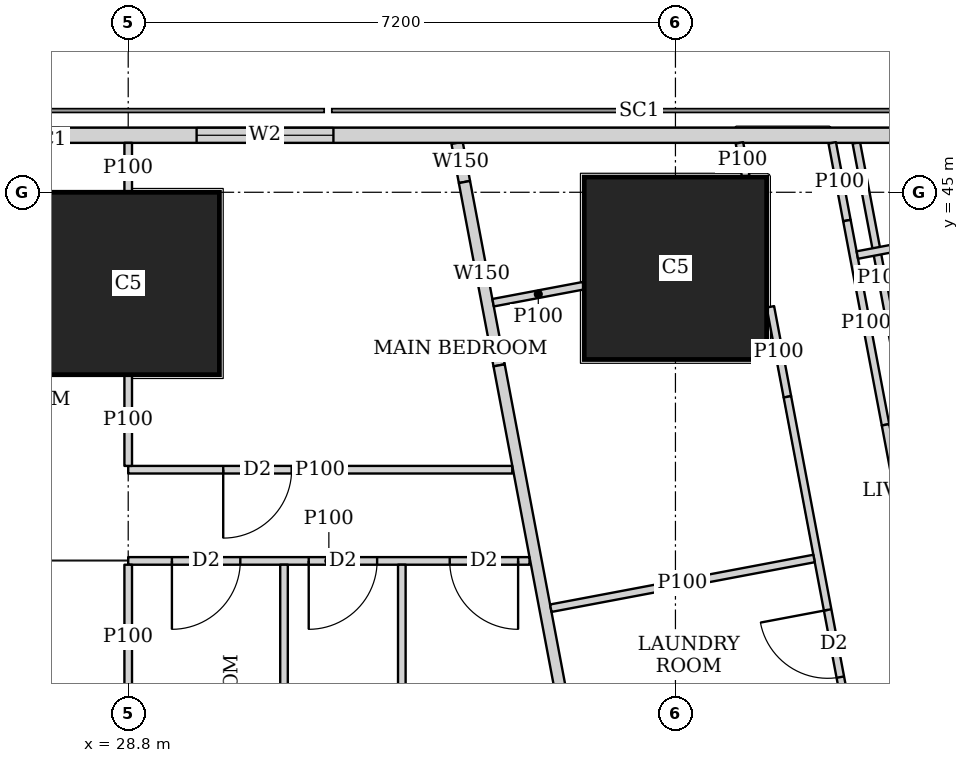
"""IFC4 building model, lengths in metres.
Left out: names, types, materials, properties, quantities, classifications, styles, units other than length and angle.
Written with IfcOpenShell. Run it as: python <this file> out.ifc"""

import sys

from ifc_helpers import new_model, si_unit, direction, frame, frame_2d, origin, origin_2d, place, context, subcontext, project, spatial, rectangle, extrude, element, fill, save


model = new_model("IFC4")
c1 = context("Model", 3, precision=1e-05, world=origin(), true_north=direction((0.0, 1.0)))
c2 = subcontext(c1, "Body", "Model", "MODEL_VIEW")
j1 = project(units=[si_unit("LENGTHUNIT", "METRE"), si_unit("PLANEANGLEUNIT", "RADIAN")], contexts=[c1])
p1 = place(None, origin())
s1 = spatial("IfcSite", under=j1, at=p1, CompositionType="ELEMENT")
p2 = place(p1, origin())
s2 = spatial("IfcBuilding", under=s1, at=p2, CompositionType="ELEMENT")
p3 = place(p2, frame((0.0, 0.0, 227.45)))
s3 = spatial("IfcBuildingStorey", under=s2, at=p3, CompositionType="ELEMENT", Elevation=227.45)
for number, where, z_axis, x_axis in (
    (1, (28.8, 43.8, 0.0), (0.0, 0.0, 1.0), (1.0, 0.0, 0.0)),
    (2, (36.0, 44.0, 0.0), (0.0, 0.0, 1.0), (1.0, 0.0, 0.0)),
):
    element("IfcColumn", number, at=place(p3, frame(where, z_axis=z_axis, x_axis=x_axis)), inside=s3, PredefinedType="COLUMN", context=c2, shape_type="SweptSolid", body=[
        extrude(rectangle(XDim=2.4, YDim=2.4, at=origin_2d()), origin(), (0.0, 0.0, 1.0), 3.75),
    ])
p4 = place(p3, frame((40.106, 45.75, 0.0), z_axis=(0.0, 0.0, 1.0), x_axis=(-1.0, 0.0, 0.0)))
e3 = element("IfcWall", 3, at=p4, inside=s3, PredefinedType="SOLIDWALL", context=c2, shape_type="SweptSolid", body=[
    extrude(rectangle(XDim=25.543, YDim=0.2, at=frame_2d((12.771, 0.0))), origin(), (0.0, 0.0, 1.0), 3.5),
])
p5 = place(p4, frame((8.606, 0.0, 0.9)))
e4 = element("IfcOpeningElement", 4, at=p5, cuts=e3, PredefinedType="OPENING", context=c2, shape_type="SweptSolid", body=[
    extrude(rectangle(XDim=1.8, YDim=1.5, at=frame_2d((0.9, 0.75))), frame((0.0, 0.11, 0.0), z_axis=(0.0, -1.0, 0.0), x_axis=(1.0, 0.0, 0.0)), (0.0, 0.0, 1.0), 0.22),
])
p6 = place(p4, frame((12.206, 0.0, 0.9)))
e5 = element("IfcOpeningElement", 5, at=p6, cuts=e3, PredefinedType="OPENING", context=c2, shape_type="SweptSolid", body=[
    extrude(rectangle(XDim=1.8, YDim=1.5, at=frame_2d((0.9, 0.75))), frame((0.0, 0.11, 0.0), z_axis=(0.0, -1.0, 0.0), x_axis=(1.0, 0.0, 0.0)), (0.0, 0.0, 1.0), 0.22),
])
p7 = place(p4, frame((15.806, 0.0, 0.9)))
e6 = element("IfcOpeningElement", 6, at=p7, cuts=e3, PredefinedType="OPENING", context=c2, shape_type="SweptSolid", body=[
    extrude(rectangle(XDim=1.8, YDim=1.5, at=frame_2d((0.9, 0.75))), frame((0.0, 0.11, 0.0), z_axis=(0.0, -1.0, 0.0), x_axis=(1.0, 0.0, 0.0)), (0.0, 0.0, 1.0), 0.22),
])
p8 = place(p4, frame((20.825, 0.0, 0.9)))
e7 = element("IfcOpeningElement", 7, at=p8, cuts=e3, PredefinedType="OPENING", context=c2, shape_type="SweptSolid", body=[
    extrude(rectangle(XDim=2.4, YDim=1.5, at=frame_2d((1.2, 0.75))), frame((0.0, 0.11, 0.0), z_axis=(0.0, -1.0, 0.0), x_axis=(1.0, 0.0, 0.0)), (0.0, 0.0, 1.0), 0.22),
])
p9 = place(p3, frame((33.127, 45.65, 0.0), z_axis=(0.0, 0.0, 1.0), x_axis=(0.185441815104, -0.982655246366, 0.0)))
e8 = element("IfcWall", 8, at=p9, inside=s3, PredefinedType="SOLIDWALL", context=c2, shape_type="SweptSolid", body=[
    extrude(rectangle(XDim=0.524, YDim=0.15, at=frame_2d((0.262, 0.0))), origin(), (0.0, 0.0, 1.0), 3.5),
])
p10 = place(p3, frame((33.224, 45.135, 0.0), z_axis=(0.0, 0.0, 1.0), x_axis=(0.185681462868, -0.982609990967, 0.0)))
e9 = element("IfcWall", 9, at=p10, inside=s3, PredefinedType="SOLIDWALL", context=c2, shape_type="SweptSolid", body=[
    extrude(rectangle(XDim=2.455, YDim=0.15, at=frame_2d((1.228, 0.0))), origin(), (0.0, 0.0, 1.0), 2.05),
])
p11 = place(p3, frame((33.68, 42.723, 0.0), z_axis=(0.0, 0.0, 1.0), x_axis=(0.185601160014, -0.982625162207, 0.0)))
e10 = element("IfcWall", 10, at=p11, inside=s3, PredefinedType="SOLIDWALL", context=c2, shape_type="SweptSolid", body=[
    extrude(rectangle(XDim=41.051, YDim=0.15, at=frame_2d((20.526, 0.0))), origin(), (0.0, 0.0, 1.0), 2.5),
])
p12 = place(p11, frame((16.123, 0.0, 0.0)))
e11 = element("IfcOpeningElement", 11, at=p12, cuts=e10, PredefinedType="OPENING", context=c2, shape_type="SweptSolid", body=[
    extrude(rectangle(XDim=1.0, YDim=2.1, at=frame_2d((0.5, 1.05))), frame((0.0, 0.085, 0.0), z_axis=(0.0, -1.0, 0.0), x_axis=(1.0, 0.0, 0.0)), (0.0, 0.0, 1.0), 0.17),
])
p13 = place(p11, frame((19.938, 0.0, 0.0)))
e12 = element("IfcOpeningElement", 12, at=p13, cuts=e10, PredefinedType="OPENING", context=c2, shape_type="SweptSolid", body=[
    extrude(rectangle(XDim=1.0, YDim=2.1, at=frame_2d((0.5, 1.05))), frame((0.0, 0.085, 0.0), z_axis=(0.0, -1.0, 0.0), x_axis=(1.0, 0.0, 0.0)), (0.0, 0.0, 1.0), 0.17),
])
p14 = place(p11, frame((30.902, 0.0, 0.0)))
e13 = element("IfcOpeningElement", 13, at=p14, cuts=e10, PredefinedType="OPENING", context=c2, shape_type="SweptSolid", body=[
    extrude(rectangle(XDim=1.0, YDim=2.1, at=frame_2d((0.5, 1.05))), frame((0.0, 0.085, 0.0), z_axis=(0.0, -1.0, 0.0), x_axis=(1.0, 0.0, 0.0)), (0.0, 0.0, 1.0), 0.17),
])
p15 = place(p3, frame((39.054, 42.085, 0.0), z_axis=(0.0, 0.0, 1.0), x_axis=(-0.185791584218, 0.982589175207, 0.0)))
e14 = element("IfcWall", 14, at=p15, inside=s3, PredefinedType="PARTITIONING", context=c2, shape_type="SweptSolid", body=[
    extrude(rectangle(XDim=3.628, YDim=0.1, at=frame_2d((1.814, 0.0))), origin(), (0.0, 0.0, 1.0), 2.05),
])
p16 = place(p3, frame((38.063, 45.65, 0.0), z_axis=(0.0, 0.0, 1.0), x_axis=(0.185677287841, -0.982610779902, 0.0)))
e15 = element("IfcWall", 15, at=p16, inside=s3, PredefinedType="PARTITIONING", context=c2, shape_type="SweptSolid", body=[
    extrude(rectangle(XDim=1.04, YDim=0.1, at=frame_2d((0.52, 0.0))), origin(), (0.0, 0.0, 1.0), 3.5),
])
p17 = place(p3, frame((38.256, 44.628, 0.0), z_axis=(0.0, 0.0, 1.0), x_axis=(0.185700639943, -0.982606366927, 0.0)))
e16 = element("IfcWall", 16, at=p17, inside=s3, PredefinedType="PARTITIONING", context=c2, shape_type="SweptSolid", body=[
    extrude(rectangle(XDim=2.735, YDim=0.1, at=frame_2d((1.367, 0.0))), origin(), (0.0, 0.0, 1.0), 2.05),
])
p18 = place(p3, frame((38.764, 41.941, 0.0), z_axis=(0.0, 0.0, 1.0), x_axis=(0.185512176227, -0.982641965556, 0.0)))
e17 = element("IfcWall", 17, at=p18, inside=s3, PredefinedType="PARTITIONING", context=c2, shape_type="SweptSolid", body=[
    extrude(rectangle(XDim=12.792, YDim=0.1, at=frame_2d((6.396, 0.0))), origin(), (0.0, 0.0, 1.0), 2.5),
])
p19 = place(p18, frame((11.35, 0.0, 0.0)))
e18 = element("IfcOpeningElement", 18, at=p19, cuts=e17, PredefinedType="OPENING", context=c2, shape_type="SweptSolid", body=[
    extrude(rectangle(XDim=0.9, YDim=2.1, at=frame_2d((0.45, 1.05))), frame((0.0, 0.06, 0.0), z_axis=(0.0, -1.0, 0.0), x_axis=(1.0, 0.0, 0.0)), (0.0, 0.0, 1.0), 0.12),
])
p20 = place(p18, frame((8.085, 0.0, 0.0)))
e19 = element("IfcOpeningElement", 19, at=p20, cuts=e17, PredefinedType="OPENING", context=c2, shape_type="SweptSolid", body=[
    extrude(rectangle(XDim=0.9, YDim=2.1, at=frame_2d((0.45, 1.05))), frame((0.0, 0.06, 0.0), z_axis=(0.0, -1.0, 0.0), x_axis=(1.0, 0.0, 0.0)), (0.0, 0.0, 1.0), 0.12),
])
p21 = place(p18, frame((3.7, 0.0, 0.0)))
e20 = element("IfcOpeningElement", 20, at=p21, cuts=e17, PredefinedType="OPENING", context=c2, shape_type="SweptSolid", body=[
    extrude(rectangle(XDim=0.9, YDim=2.1, at=frame_2d((0.45, 1.05))), frame((0.0, 0.06, 0.0), z_axis=(0.0, -1.0, 0.0), x_axis=(1.0, 0.0, 0.0)), (0.0, 0.0, 1.0), 0.12),
])
p22 = place(p3, frame((36.842, 45.65, 0.0), z_axis=(0.0, 0.0, 1.0), x_axis=(0.185407859198, -0.982661653748, 0.0)))
e21 = element("IfcWall", 21, at=p22, inside=s3, PredefinedType="PARTITIONING", context=c2, shape_type="SweptSolid", body=[
    extrude(rectangle(XDim=0.448, YDim=0.1, at=frame_2d((0.224, 0.0))), origin(), (0.0, 0.0, 1.0), 3.5),
])
p23 = place(p3, frame((37.249, 43.493, 0.0), z_axis=(0.0, 0.0, 1.0), x_axis=(0.185817643817, -0.982584247404, 0.0)))
e22 = element("IfcWall", 22, at=p23, inside=s3, PredefinedType="PARTITIONING", context=c2, shape_type="SweptSolid", body=[
    extrude(rectangle(XDim=1.205, YDim=0.1, at=frame_2d((0.603, 0.0))), origin(), (0.0, 0.0, 1.0), 2.05),
])
p24 = place(p3, frame((37.473, 42.309, 0.0), z_axis=(0.0, 0.0, 1.0), x_axis=(0.185570636839, -0.982630927024, 0.0)))
e23 = element("IfcWall", 23, at=p24, inside=s3, PredefinedType="PARTITIONING", context=c2, shape_type="SweptSolid", body=[
    extrude(rectangle(XDim=13.553, YDim=0.1, at=frame_2d((6.777, 0.0))), origin(), (0.0, 0.0, 1.0), 2.5),
])
p25 = place(p24, frame((12.128, 0.0, 0.0)))
e24 = element("IfcOpeningElement", 24, at=p25, cuts=e23, PredefinedType="OPENING", context=c2, shape_type="SweptSolid", body=[
    extrude(rectangle(XDim=0.9, YDim=2.1, at=frame_2d((0.45, 1.05))), frame((0.0, 0.06, 0.0), z_axis=(0.0, -1.0, 0.0), x_axis=(1.0, 0.0, 0.0)), (0.0, 0.0, 1.0), 0.12),
])
p26 = place(p24, frame((8.487, 0.0, 0.0)))
e25 = element("IfcOpeningElement", 25, at=p26, cuts=e23, PredefinedType="OPENING", context=c2, shape_type="SweptSolid", body=[
    extrude(rectangle(XDim=0.9, YDim=2.1, at=frame_2d((0.45, 1.05))), frame((0.0, 0.06, 0.0), z_axis=(0.0, -1.0, 0.0), x_axis=(1.0, 0.0, 0.0)), (0.0, 0.0, 1.0), 0.12),
])
p27 = place(p24, frame((2.853, 0.0, 0.0)))
e26 = element("IfcOpeningElement", 26, at=p27, cuts=e23, PredefinedType="OPENING", context=c2, shape_type="SweptSolid", body=[
    extrude(rectangle(XDim=0.9, YDim=2.1, at=frame_2d((0.45, 1.05))), frame((0.0, 0.06, 0.0), z_axis=(0.0, -1.0, 0.0), x_axis=(1.0, 0.0, 0.0)), (0.0, 0.0, 1.0), 0.12),
])
p28 = place(p24, frame((10.22, 0.0, 0.0)))
e27 = element("IfcOpeningElement", 27, at=p28, cuts=e23, PredefinedType="OPENING", context=c2, shape_type="SweptSolid", body=[
    extrude(rectangle(XDim=0.9, YDim=2.1, at=frame_2d((0.45, 1.05))), frame((0.0, 0.06, 0.0), z_axis=(0.0, -1.0, 0.0), x_axis=(1.0, 0.0, 0.0)), (0.0, 0.0, 1.0), 0.12),
])
p29 = place(p24, frame((5.819, 0.0, 0.0)))
e28 = element("IfcOpeningElement", 28, at=p29, cuts=e23, PredefinedType="OPENING", context=c2, shape_type="SweptSolid", body=[
    extrude(rectangle(XDim=0.9, YDim=2.1, at=frame_2d((0.45, 1.05))), frame((0.0, 0.06, 0.0), z_axis=(0.0, -1.0, 0.0), x_axis=(1.0, 0.0, 0.0)), (0.0, 0.0, 1.0), 0.12),
])
p30 = place(p3, frame((41.968, 44.85, 0.0), z_axis=(0.0, 0.0, 1.0), x_axis=(-0.98258614234, -0.185807623311, 0.0)))
e29 = element("IfcWall", 29, at=p30, inside=s3, PredefinedType="PARTITIONING", context=c2, shape_type="SweptSolid", body=[
    extrude(rectangle(XDim=3.638, YDim=0.1, at=frame_2d((1.819, 0.0))), origin(), (0.0, 0.0, 1.0), 2.05),
])
p31 = place(p3, frame((34.79, 43.771, 0.0), z_axis=(0.0, 0.0, 1.0), x_axis=(-0.982730261052, -0.18504387051, 0.0)))
e30 = element("IfcWall", 30, at=p31, inside=s3, PredefinedType="PARTITIONING", context=c2, shape_type="SweptSolid", body=[
    extrude(rectangle(XDim=1.21, YDim=0.1, at=frame_2d((0.605, 0.0))), origin(), (0.0, 0.0, 1.0), 2.05),
])
p32 = place(p3, frame((37.824, 40.182, 0.0), z_axis=(0.0, 0.0, 1.0), x_axis=(-0.982648794755, -0.185475998897, 0.0)))
e31 = element("IfcWall", 31, at=p32, inside=s3, PredefinedType="PARTITIONING", context=c2, shape_type="SweptSolid", body=[
    extrude(rectangle(XDim=3.525, YDim=0.1, at=frame_2d((1.763, 0.0))), origin(), (0.0, 0.0, 1.0), 3.5),
])
p33 = place(p3, frame((28.8, 41.35, 0.0), z_axis=(0.0, 0.0, 1.0), x_axis=(1.0, 0.0, 0.0)))
e32 = element("IfcWall", 32, at=p33, inside=s3, PredefinedType="PARTITIONING", context=c2, shape_type="SweptSolid", body=[
    extrude(rectangle(XDim=5.053, YDim=0.1, at=frame_2d((2.526, 0.0))), origin(), (0.0, 0.0, 1.0), 3.5),
])
p34 = place(p33, frame((1.25, 0.0, 0.0)))
e33 = element("IfcOpeningElement", 33, at=p34, cuts=e32, PredefinedType="OPENING", context=c2, shape_type="SweptSolid", body=[
    extrude(rectangle(XDim=0.9, YDim=2.1, at=frame_2d((0.45, 1.05))), frame((0.0, 0.06, 0.0), z_axis=(0.0, -1.0, 0.0), x_axis=(1.0, 0.0, 0.0)), (0.0, 0.0, 1.0), 0.12),
])
p35 = place(p3, frame((28.8, 40.15, 0.0), z_axis=(0.0, 0.0, 1.0), x_axis=(1.0, 0.0, 0.0)))
e34 = element("IfcWall", 34, at=p35, inside=s3, PredefinedType="PARTITIONING", context=c2, shape_type="SweptSolid", body=[
    extrude(rectangle(XDim=5.28, YDim=0.1, at=frame_2d((2.64, 0.0))), origin(), (0.0, 0.0, 1.0), 3.5),
])
p36 = place(p35, frame((0.575, 0.0, 0.0)))
e35 = element("IfcOpeningElement", 35, at=p36, cuts=e34, PredefinedType="OPENING", context=c2, shape_type="SweptSolid", body=[
    extrude(rectangle(XDim=0.9, YDim=2.1, at=frame_2d((0.45, 1.05))), frame((0.0, 0.06, 0.0), z_axis=(0.0, -1.0, 0.0), x_axis=(1.0, 0.0, 0.0)), (0.0, 0.0, 1.0), 0.12),
])
p37 = place(p35, frame((4.23, 0.0, 0.0)))
e36 = element("IfcOpeningElement", 36, at=p37, cuts=e34, PredefinedType="OPENING", context=c2, shape_type="SweptSolid", body=[
    extrude(rectangle(XDim=0.9, YDim=2.1, at=frame_2d((0.45, 1.05))), frame((0.0, 0.06, 0.0), z_axis=(0.0, -1.0, 0.0), x_axis=(1.0, 0.0, 0.0)), (0.0, 0.0, 1.0), 0.12),
])
p38 = place(p35, frame((2.375, 0.0, 0.0)))
e37 = element("IfcOpeningElement", 37, at=p38, cuts=e34, PredefinedType="OPENING", context=c2, shape_type="SweptSolid", body=[
    extrude(rectangle(XDim=0.9, YDim=2.1, at=frame_2d((0.45, 1.05))), frame((0.0, 0.06, 0.0), z_axis=(0.0, -1.0, 0.0), x_axis=(1.0, 0.0, 0.0)), (0.0, 0.0, 1.0), 0.12),
])
p39 = place(p3, frame((28.8, 41.4, 0.0), z_axis=(0.0, 0.0, 1.0), x_axis=(0.0, 1.0, 0.0)))
e38 = element("IfcWall", 38, at=p39, inside=s3, PredefinedType="PARTITIONING", context=c2, shape_type="SweptSolid", body=[
    extrude(rectangle(XDim=1.199, YDim=0.1, at=frame_2d((0.6, 0.0))), origin(), (0.0, 0.0, 1.0), 3.5),
])
p40 = place(p3, frame((28.8, 45.001, 0.0), z_axis=(0.0, 0.0, 1.0), x_axis=(0.0, 1.0, 0.0)))
e39 = element("IfcWall", 39, at=p40, inside=s3, PredefinedType="PARTITIONING", context=c2, shape_type="SweptSolid", body=[
    extrude(rectangle(XDim=0.649, YDim=0.1, at=frame_2d((0.324, 0.0))), origin(), (0.0, 0.0, 1.0), 3.5),
])
p41 = place(p3, frame((28.8, 38.201, 0.0), z_axis=(0.0, 0.0, 1.0), x_axis=(0.0, 1.0, 0.0)))
e40 = element("IfcWall", 40, at=p41, inside=s3, PredefinedType="PARTITIONING", context=c2, shape_type="SweptSolid", body=[
    extrude(rectangle(XDim=1.899, YDim=0.1, at=frame_2d((0.95, 0.0))), origin(), (0.0, 0.0, 1.0), 3.5),
])
for number, where, z_axis, x_axis in (
    (41, (32.4, 36.575, 0.0), (0.0, 0.0, 1.0), (0.0, 1.0, 0.0)),
    (42, (30.85, 36.575, 0.0), (0.0, 0.0, 1.0), (0.0, 1.0, 0.0)),
):
    element("IfcWall", number, at=place(p3, frame(where, z_axis=z_axis, x_axis=x_axis)), inside=s3, PredefinedType="PARTITIONING", context=c2, shape_type="SweptSolid", body=[
        extrude(rectangle(XDim=3.525, YDim=0.1, at=frame_2d((1.763, 0.0))), origin(), (0.0, 0.0, 1.0), 3.5),
    ])
p42 = place(p5, origin())
e43 = element("IfcWindow", 43, at=p42, inside=s3, PartitioningType="SINGLE_PANEL", PredefinedType="WINDOW", context=c2, shape_type="SweptSolid", body=[
    extrude(rectangle(XDim=1.8, YDim=1.5, at=frame_2d((0.9, 0.75))), frame((0.0, 0.03, 0.0), z_axis=(0.0, -1.0, 0.0), x_axis=(1.0, 0.0, 0.0)), (0.0, 0.0, 1.0), 0.06),
])
fill(e4, e43)
p43 = place(p6, origin())
e44 = element("IfcWindow", 44, at=p43, inside=s3, PartitioningType="SINGLE_PANEL", PredefinedType="WINDOW", context=c2, shape_type="SweptSolid", body=[
    extrude(rectangle(XDim=1.8, YDim=1.5, at=frame_2d((0.9, 0.75))), frame((0.0, 0.03, 0.0), z_axis=(0.0, -1.0, 0.0), x_axis=(1.0, 0.0, 0.0)), (0.0, 0.0, 1.0), 0.06),
])
fill(e5, e44)
p44 = place(p27, origin())
e45 = element("IfcDoor", 45, at=p44, inside=s3, OperationType="SINGLE_SWING_RIGHT", PredefinedType="DOOR", context=c2, shape_type="SweptSolid", body=[
    extrude(rectangle(XDim=0.9, YDim=2.1, at=frame_2d((0.45, 1.05))), frame((0.0, 0.025, 0.0), z_axis=(0.0, -1.0, 0.0), x_axis=(1.0, 0.0, 0.0)), (0.0, 0.0, 1.0), 0.05),
])
fill(e26, e45)
p45 = place(p34, origin())
e46 = element("IfcDoor", 46, at=p45, inside=s3, OperationType="SINGLE_SWING_RIGHT", PredefinedType="DOOR", context=c2, shape_type="SweptSolid", body=[
    extrude(rectangle(XDim=0.9, YDim=2.1, at=frame_2d((0.45, 1.05))), frame((0.0, 0.025, 0.0), z_axis=(0.0, -1.0, 0.0), x_axis=(1.0, 0.0, 0.0)), (0.0, 0.0, 1.0), 0.05),
])
fill(e33, e46)
p46 = place(p36, origin())
e47 = element("IfcDoor", 47, at=p46, inside=s3, OperationType="SINGLE_SWING_RIGHT", PredefinedType="DOOR", context=c2, shape_type="SweptSolid", body=[
    extrude(rectangle(XDim=0.9, YDim=2.1, at=frame_2d((0.45, 1.05))), frame((0.0, 0.025, 0.0), z_axis=(0.0, -1.0, 0.0), x_axis=(1.0, 0.0, 0.0)), (0.0, 0.0, 1.0), 0.05),
])
fill(e35, e47)
p47 = place(p37, origin())
e48 = element("IfcDoor", 48, at=p47, inside=s3, OperationType="SINGLE_SWING_LEFT", PredefinedType="DOOR", context=c2, shape_type="SweptSolid", body=[
    extrude(rectangle(XDim=0.9, YDim=2.1, at=frame_2d((0.45, 1.05))), frame((0.0, 0.025, 0.0), z_axis=(0.0, -1.0, 0.0), x_axis=(1.0, 0.0, 0.0)), (0.0, 0.0, 1.0), 0.05),
])
fill(e36, e48)
p48 = place(p38, origin())
e49 = element("IfcDoor", 49, at=p48, inside=s3, OperationType="SINGLE_SWING_RIGHT", PredefinedType="DOOR", context=c2, shape_type="SweptSolid", body=[
    extrude(rectangle(XDim=0.9, YDim=2.1, at=frame_2d((0.45, 1.05))), frame((0.0, 0.025, 0.0), z_axis=(0.0, -1.0, 0.0), x_axis=(1.0, 0.0, 0.0)), (0.0, 0.0, 1.0), 0.05),
])
fill(e37, e49)
save(model, sys.argv[1])
